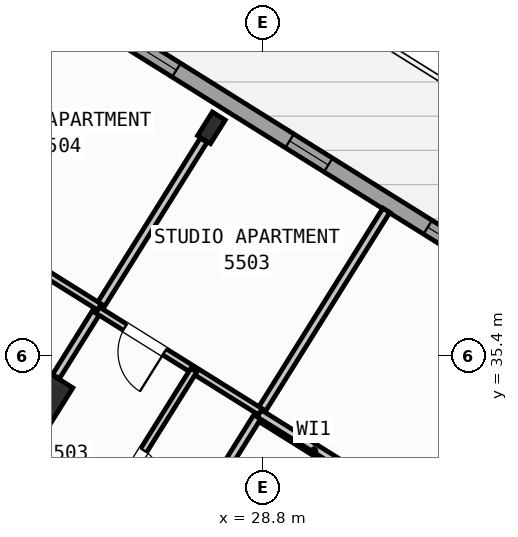
"""IFC4 building model, lengths in metres.
Left out: names, types, materials, properties, quantities, classifications, styles, units other than length and angle.
Written with IfcOpenShell. Run it as: python <this file> out.ifc"""

import sys

from ifc_helpers import new_model, si_unit, direction, frame, frame_2d, origin, origin_2d, place, context, subcontext, project, spatial, rectangle, hollow_rectangle, i_section, extrude, source, transform, mapped, element, fill, save


model = new_model("IFC4")
c1 = context("Model", 3, precision=1e-05, world=origin(), true_north=direction((0.0, 1.0)))
c2 = subcontext(c1, "Body", "Model", "MODEL_VIEW")
j1 = project(units=[si_unit("LENGTHUNIT", "METRE"), si_unit("PLANEANGLEUNIT", "RADIAN")], contexts=[c1])
p1 = place(None, origin())
s1 = spatial("IfcSite", under=j1, at=p1, CompositionType="ELEMENT")
p2 = place(p1, origin())
s2 = spatial("IfcBuilding", under=s1, at=p2, CompositionType="ELEMENT")
p3 = place(p2, frame((0.0, 0.0, 218.4)))
s3 = spatial("IfcBuildingStorey", under=s2, at=p3, CompositionType="ELEMENT", Elevation=218.4)
m1 = source(origin(), c2, "Body", "SweptSolid", [
    extrude(i_section(OverallWidth=0.3, OverallDepth=0.55, WebThickness=0.015, FlangeThickness=0.029, at=origin_2d()), origin(), (0.0, 0.0, 1.0), 3.6),
])
p4 = place(p3, frame((27.786, 39.901, 0.0), z_axis=(0.0, 0.0, 1.0), x_axis=(-0.848048096156, 0.529919264233, 0.0)))
e1 = element("IfcColumn", 1, at=p4, inside=s3, PredefinedType="COLUMN", context=c2, shape_type="MappedRepresentation", body=[
    mapped(m1, transform((0.0, 0.0, 0.0), scale=1.0)),
])
m2 = source(origin(), c2, "Body", "SweptSolid", [
    extrude(hollow_rectangle(XDim=0.8, YDim=0.8, WallThickness=0.032, at=origin_2d()), origin(), (0.0, 0.0, 1.0), 3.6),
])
p5 = place(p3, frame((24.5, 34.643, 0.0), z_axis=(0.0, 0.0, 1.0), x_axis=(-0.848048096156, 0.529919264233, 0.0)))
e2 = element("IfcColumn", 2, at=p5, inside=s3, PredefinedType="COLUMN", context=c2, shape_type="MappedRepresentation", body=[
    mapped(m2, transform((0.0, 0.0, 0.0), scale=1.0)),
])
p6 = place(p3, frame((17.424, 47.083, 0.0), z_axis=(0.0, 0.0, 1.0), x_axis=(0.848049927979, -0.529916332693, 0.0)))
e3 = element("IfcWall", 3, at=p6, inside=s3, PredefinedType="STANDARD", context=c2, shape_type="SweptSolid", body=[
    extrude(rectangle(XDim=29.223, YDim=0.32, at=frame_2d((14.612, 0.0))), origin(), (0.0, 0.0, 1.0), 3.35),
])
p7 = place(p6, frame((3.77, 0.0, 0.0)))
e4 = element("IfcOpeningElement", 4, at=p7, cuts=e3, PredefinedType="OPENING", context=c2, shape_type="SweptSolid", body=[
    extrude(rectangle(XDim=1.05, YDim=2.15, at=frame_2d((0.525, 1.075))), frame((0.0, 0.17, 0.0), z_axis=(0.0, -1.0, 0.0), x_axis=(1.0, 0.0, 0.0)), (0.0, 0.0, 1.0), 0.34),
])
p8 = place(p6, frame((1.125, 0.0, 0.9)))
e5 = element("IfcOpeningElement", 5, at=p8, cuts=e3, PredefinedType="OPENING", context=c2, shape_type="SweptSolid", body=[
    extrude(rectangle(XDim=1.65, YDim=1.45, at=frame_2d((0.825, 0.725))), frame((0.0, 0.17, 0.0), z_axis=(0.0, -1.0, 0.0), x_axis=(1.0, 0.0, 0.0)), (0.0, 0.0, 1.0), 0.34),
])
p9 = place(p6, frame((7.384, 0.0, 0.9)))
e6 = element("IfcOpeningElement", 6, at=p9, cuts=e3, PredefinedType="OPENING", context=c2, shape_type="SweptSolid", body=[
    extrude(rectangle(XDim=1.35, YDim=1.45, at=frame_2d((0.675, 0.725))), frame((0.0, 0.17, 0.0), z_axis=(0.0, -1.0, 0.0), x_axis=(1.0, 0.0, 0.0)), (0.0, 0.0, 1.0), 0.34),
])
p10 = place(p6, frame((10.054, 0.0, 0.9)))
e7 = element("IfcOpeningElement", 7, at=p10, cuts=e3, PredefinedType="OPENING", context=c2, shape_type="SweptSolid", body=[
    extrude(rectangle(XDim=1.35, YDim=1.45, at=frame_2d((0.675, 0.725))), frame((0.0, 0.17, 0.0), z_axis=(0.0, -1.0, 0.0), x_axis=(1.0, 0.0, 0.0)), (0.0, 0.0, 1.0), 0.34),
])
p11 = place(p6, frame((14.039, 0.0, 1.0)))
e8 = element("IfcOpeningElement", 8, at=p11, cuts=e3, PredefinedType="OPENING", context=c2, shape_type="SweptSolid", body=[
    extrude(rectangle(XDim=0.9, YDim=1.25, at=frame_2d((0.45, 0.625))), frame((0.0, 0.17, 0.0), z_axis=(0.0, -1.0, 0.0), x_axis=(1.0, 0.0, 0.0)), (0.0, 0.0, 1.0), 0.34),
])
p12 = place(p6, frame((17.254, 0.0, 1.0)))
e9 = element("IfcOpeningElement", 9, at=p12, cuts=e3, PredefinedType="OPENING", context=c2, shape_type="SweptSolid", body=[
    extrude(rectangle(XDim=0.9, YDim=1.25, at=frame_2d((0.45, 0.625))), frame((0.0, 0.17, 0.0), z_axis=(0.0, -1.0, 0.0), x_axis=(1.0, 0.0, 0.0)), (0.0, 0.0, 1.0), 0.34),
])
p13 = place(p6, frame((20.161, 0.0, 0.9)))
e10 = element("IfcOpeningElement", 10, at=p13, cuts=e3, PredefinedType="OPENING", context=c2, shape_type="SweptSolid", body=[
    extrude(rectangle(XDim=1.35, YDim=1.45, at=frame_2d((0.675, 0.725))), frame((0.0, 0.17, 0.0), z_axis=(0.0, -1.0, 0.0), x_axis=(1.0, 0.0, 0.0)), (0.0, 0.0, 1.0), 0.34),
])
p14 = place(p6, frame((22.846, 0.0, 0.9)))
e11 = element("IfcOpeningElement", 11, at=p14, cuts=e3, PredefinedType="OPENING", context=c2, shape_type="SweptSolid", body=[
    extrude(rectangle(XDim=1.35, YDim=1.45, at=frame_2d((0.675, 0.725))), frame((0.0, 0.17, 0.0), z_axis=(0.0, -1.0, 0.0), x_axis=(1.0, 0.0, 0.0)), (0.0, 0.0, 1.0), 0.34),
])
p15 = place(p6, frame((26.898, 0.0, 1.0)))
e12 = element("IfcOpeningElement", 12, at=p15, cuts=e3, PredefinedType="OPENING", context=c2, shape_type="SweptSolid", body=[
    extrude(rectangle(XDim=0.9, YDim=1.25, at=frame_2d((0.45, 0.625))), frame((0.0, 0.17, 0.0), z_axis=(0.0, -1.0, 0.0), x_axis=(1.0, 0.0, 0.0)), (0.0, 0.0, 1.0), 0.34),
])
p16 = place(p3, frame((30.914, 32.829, 0.0), z_axis=(0.0, 0.0, 1.0), x_axis=(-0.848008813643, 0.529982124211, 0.0)))
e13 = element("IfcWall", 13, at=p16, inside=s3, PredefinedType="PARTITIONING", context=c2, shape_type="SweptSolid", body=[
    extrude(rectangle(XDim=2.61, YDim=0.16, at=frame_2d((1.305, 0.0))), origin(), (0.0, 0.0, 1.0), 3.34),
])
p17 = place(p3, frame((31.239, 38.274, 0.0), z_axis=(0.0, 0.0, 1.0), x_axis=(-0.529920220799, -0.848047498427, 0.0)))
e14 = element("IfcWall", 14, at=p17, inside=s3, PredefinedType="PARTITIONING", context=c2, shape_type="SweptSolid", body=[
    extrude(rectangle(XDim=9.2, YDim=0.16, at=frame_2d((4.6, 0.0))), origin(), (0.0, 0.0, 1.0), 3.34),
])
p18 = place(p3, frame((26.363, 30.472, 0.0), z_axis=(0.0, 0.0, 1.0), x_axis=(-0.848052408131, 0.529912363569, 0.0)))
e15 = element("IfcWall", 15, at=p18, inside=s3, PredefinedType="PARTITIONING", context=c2, shape_type="SweptSolid", body=[
    extrude(rectangle(XDim=16.73, YDim=0.16, at=frame_2d((8.365, 0.0))), origin(), (0.0, 0.0, 1.0), 3.34),
])
p19 = place(p18, frame((2.22, 0.0, 0.0)))
e16 = element("IfcOpeningElement", 16, at=p19, cuts=e15, PredefinedType="OPENING", context=c2, shape_type="SweptSolid", body=[
    extrude(rectangle(XDim=0.86, YDim=2.05, at=frame_2d((0.43, 1.025))), frame((0.0, 0.09, 0.0), z_axis=(0.0, -1.0, 0.0), x_axis=(1.0, 0.0, 0.0)), (0.0, 0.0, 1.0), 0.18),
])
p20 = place(p18, frame((7.82, 0.0, 0.0)))
e17 = element("IfcOpeningElement", 17, at=p20, cuts=e15, PredefinedType="OPENING", context=c2, shape_type="SweptSolid", body=[
    extrude(rectangle(XDim=1.0, YDim=2.1, at=frame_2d((0.5, 1.05))), frame((0.0, 0.09, 0.0), z_axis=(0.0, -1.0, 0.0), x_axis=(1.0, 0.0, 0.0)), (0.0, 0.0, 1.0), 0.18),
])
p21 = place(p18, frame((12.95, 0.0, 0.0)))
e18 = element("IfcOpeningElement", 18, at=p21, cuts=e15, PredefinedType="OPENING", context=c2, shape_type="SweptSolid", body=[
    extrude(rectangle(XDim=1.0, YDim=2.1, at=frame_2d((0.5, 1.05))), frame((0.0, 0.09, 0.0), z_axis=(0.0, -1.0, 0.0), x_axis=(1.0, 0.0, 0.0)), (0.0, 0.0, 1.0), 0.18),
])
p22 = place(p3, frame((25.198, 28.606, 0.0), z_axis=(0.0, 0.0, 1.0), x_axis=(-0.848052408131, 0.529912363569, 0.0)))
e19 = element("IfcWall", 19, at=p22, inside=s3, PredefinedType="PARTITIONING", context=c2, shape_type="SweptSolid", body=[
    extrude(rectangle(XDim=16.73, YDim=0.16, at=frame_2d((8.365, 0.0))), origin(), (0.0, 0.0, 1.0), 3.34),
])
p23 = place(p22, frame((2.22, 0.0, 0.0)))
e20 = element("IfcOpeningElement", 20, at=p23, cuts=e19, PredefinedType="OPENING", context=c2, shape_type="SweptSolid", body=[
    extrude(rectangle(XDim=0.86, YDim=2.05, at=frame_2d((0.43, 1.025))), frame((0.0, 0.09, 0.0), z_axis=(0.0, -1.0, 0.0), x_axis=(1.0, 0.0, 0.0)), (0.0, 0.0, 1.0), 0.18),
])
p24 = place(p22, frame((12.084, 0.0, 0.0)))
e21 = element("IfcOpeningElement", 21, at=p24, cuts=e19, PredefinedType="OPENING", context=c2, shape_type="SweptSolid", body=[
    extrude(rectangle(XDim=1.0, YDim=2.1, at=frame_2d((0.5, 1.05))), frame((0.0, 0.09, 0.0), z_axis=(0.0, -1.0, 0.0), x_axis=(1.0, 0.0, 0.0)), (0.0, 0.0, 1.0), 0.18),
])
p25 = place(p3, frame((27.634, 39.657, 0.0), z_axis=(0.0, 0.0, 1.0), x_axis=(-0.529899205623, -0.848060629837, 0.0)))
e22 = element("IfcWall", 22, at=p25, inside=s3, PredefinedType="PARTITIONING", context=c2, shape_type="SweptSolid", body=[
    extrude(rectangle(XDim=5.501, YDim=0.16, at=frame_2d((2.75, 0.0))), origin(), (0.0, 0.0, 1.0), 2.825),
])
p26 = place(p3, frame((28.753, 34.297, 0.0), z_axis=(0.0, 0.0, 1.0), x_axis=(-0.848059820872, 0.529900500304, 0.0)))
e23 = element("IfcWall", 23, at=p26, inside=s3, PredefinedType="PLUMBINGWALL", context=c2, shape_type="SweptSolid", body=[
    extrude(rectangle(XDim=3.79, YDim=0.14, at=frame_2d((1.895, 0.0))), origin(), (0.0, 0.0, 1.0), 3.34),
])
p27 = place(p26, frame((2.23, 0.0, 0.0)))
e24 = element("IfcOpeningElement", 24, at=p27, cuts=e23, PredefinedType="OPENING", context=c2, shape_type="SweptSolid", body=[
    extrude(rectangle(XDim=0.92, YDim=2.08, at=frame_2d((0.46, 1.04))), frame((0.0, 0.08, 0.0), z_axis=(0.0, -1.0, 0.0), x_axis=(1.0, 0.0, 0.0)), (0.0, 0.0, 1.0), 0.16),
])
p28 = place(p3, frame((27.439, 35.118, 0.0), z_axis=(0.0, 0.0, 1.0), x_axis=(-0.529911350634, -0.84805304107, 0.0)))
e25 = element("IfcWall", 25, at=p28, inside=s3, PredefinedType="PLUMBINGWALL", context=c2, shape_type="SweptSolid", body=[
    extrude(rectangle(XDim=4.51, YDim=0.14, at=frame_2d((2.255, 0.0))), origin(), (0.0, 0.0, 1.0), 2.995),
])
p29 = place(p28, frame((1.865, 0.0, 0.0)))
e26 = element("IfcOpeningElement", 26, at=p29, cuts=e25, PredefinedType="OPENING", context=c2, shape_type="SweptSolid", body=[
    extrude(rectangle(XDim=0.78, YDim=2.05, at=frame_2d((0.39, 1.025))), frame((0.0, 0.08, 0.0), z_axis=(0.0, -1.0, 0.0), x_axis=(1.0, 0.0, 0.0)), (0.0, 0.0, 1.0), 0.16),
])
p30 = place(p3, frame((25.576, 36.365, 0.0), z_axis=(0.0, 0.0, 1.0), x_axis=(-0.848056163074, 0.529906354247, 0.0)))
e27 = element("IfcWall", 27, at=p30, inside=s3, PredefinedType="PLUMBINGWALL", context=c2, shape_type="SweptSolid", body=[
    extrude(rectangle(XDim=6.4, YDim=0.14, at=frame_2d((3.2, 0.0))), origin(), (0.0, 0.0, 1.0), 3.34),
])
p31 = place(p30, frame((4.04, 0.0, 0.0)))
e28 = element("IfcOpeningElement", 28, at=p31, cuts=e27, PredefinedType="OPENING", context=c2, shape_type="SweptSolid", body=[
    extrude(rectangle(XDim=0.92, YDim=2.08, at=frame_2d((0.46, 1.04))), frame((0.0, 0.08, 0.0), z_axis=(0.0, -1.0, 0.0), x_axis=(1.0, 0.0, 0.0)), (0.0, 0.0, 1.0), 0.16),
])
p32 = place(p3, frame((41.936, 26.012, 0.0), z_axis=(0.0, 0.0, 1.0), x_axis=(-0.848051154596, 0.529914369676, 0.0)))
e29 = element("IfcWall", 29, at=p32, inside=s3, PredefinedType="PARTITIONING", context=c2, shape_type="SweptSolid", body=[
    extrude(rectangle(XDim=15.57, YDim=0.16, at=frame_2d((7.785, 0.0))), origin(), (0.0, 0.0, 1.0), 3.34),
])
p33 = place(p32, frame((3.415, 0.0, 0.0)))
e30 = element("IfcOpeningElement", 30, at=p33, cuts=e29, PredefinedType="OPENING", context=c2, shape_type="SweptSolid", body=[
    extrude(rectangle(XDim=1.0, YDim=2.1, at=frame_2d((0.5, 1.05))), frame((0.0, 0.09, 0.0), z_axis=(0.0, -1.0, 0.0), x_axis=(1.0, 0.0, 0.0)), (0.0, 0.0, 1.0), 0.18),
])
p34 = place(p32, frame((10.565, 0.0, 0.0)))
e31 = element("IfcOpeningElement", 31, at=p34, cuts=e29, PredefinedType="OPENING", context=c2, shape_type="SweptSolid", body=[
    extrude(rectangle(XDim=1.0, YDim=2.1, at=frame_2d((0.5, 1.05))), frame((0.0, 0.09, 0.0), z_axis=(0.0, -1.0, 0.0), x_axis=(1.0, 0.0, 0.0)), (0.0, 0.0, 1.0), 0.18),
])
m3 = source(origin(), c2, "Body", "SweptSolid", [
    extrude(rectangle(XDim=1.35, YDim=1.45, at=frame_2d((0.675, 0.725))), frame((0.0, 0.03, 0.0), z_axis=(0.0, -1.0, 0.0), x_axis=(1.0, 0.0, 0.0)), (0.0, 0.0, 1.0), 0.06),
])
p35 = place(p10, origin())
e32 = element("IfcWindow", 32, at=p35, inside=s3, PartitioningType="SINGLE_PANEL", PredefinedType="WINDOW", context=c2, shape_type="MappedRepresentation", body=[
    mapped(m3, transform((0.0, 0.0, 0.0), scale=1.0)),
])
fill(e7, e32)
m4 = source(origin(), c2, "Body", "SweptSolid", [
    extrude(rectangle(XDim=0.9, YDim=1.25, at=frame_2d((0.45, 0.625))), frame((0.0, 0.03, 0.0), z_axis=(0.0, -1.0, 0.0), x_axis=(1.0, 0.0, 0.0)), (0.0, 0.0, 1.0), 0.06),
])
p36 = place(p11, origin())
e33 = element("IfcWindow", 33, at=p36, inside=s3, PartitioningType="SINGLE_PANEL", PredefinedType="WINDOW", context=c2, shape_type="MappedRepresentation", body=[
    mapped(m4, transform((0.0, 0.0, 0.0), scale=1.0)),
])
fill(e8, e33)
p37 = place(p12, origin())
e34 = element("IfcWindow", 34, at=p37, inside=s3, PartitioningType="SINGLE_PANEL", PredefinedType="WINDOW", context=c2, shape_type="MappedRepresentation", body=[
    mapped(m4, transform((0.0, 0.0, 0.0), scale=1.0)),
])
fill(e9, e34)
m5 = source(origin(), c2, "Body", "SweptSolid", [
    extrude(rectangle(XDim=0.92, YDim=2.08, at=frame_2d((0.46, 1.04))), frame((0.0, 0.025, 0.0), z_axis=(0.0, -1.0, 0.0), x_axis=(1.0, 0.0, 0.0)), (0.0, 0.0, 1.0), 0.05),
])
p38 = place(p27, origin())
e35 = element("IfcDoor", 35, at=p38, inside=s3, OperationType="SINGLE_SWING_LEFT", PredefinedType="DOOR", context=c2, shape_type="MappedRepresentation", body=[
    mapped(m5, transform((0.0, 0.0, 0.0), scale=1.0)),
])
fill(e24, e35)
m6 = source(origin(), c2, "Body", "SweptSolid", [
    extrude(rectangle(XDim=0.78, YDim=2.05, at=frame_2d((0.39, 1.025))), frame((0.0, 0.025, 0.0), z_axis=(0.0, -1.0, 0.0), x_axis=(1.0, 0.0, 0.0)), (0.0, 0.0, 1.0), 0.05),
])
p39 = place(p29, origin())
e36 = element("IfcDoor", 36, at=p39, inside=s3, OperationType="SINGLE_SWING_RIGHT", PredefinedType="DOOR", context=c2, shape_type="MappedRepresentation", body=[
    mapped(m6, transform((0.0, 0.0, 0.0), scale=1.0)),
])
fill(e26, e36)
save(model, sys.argv[1])
